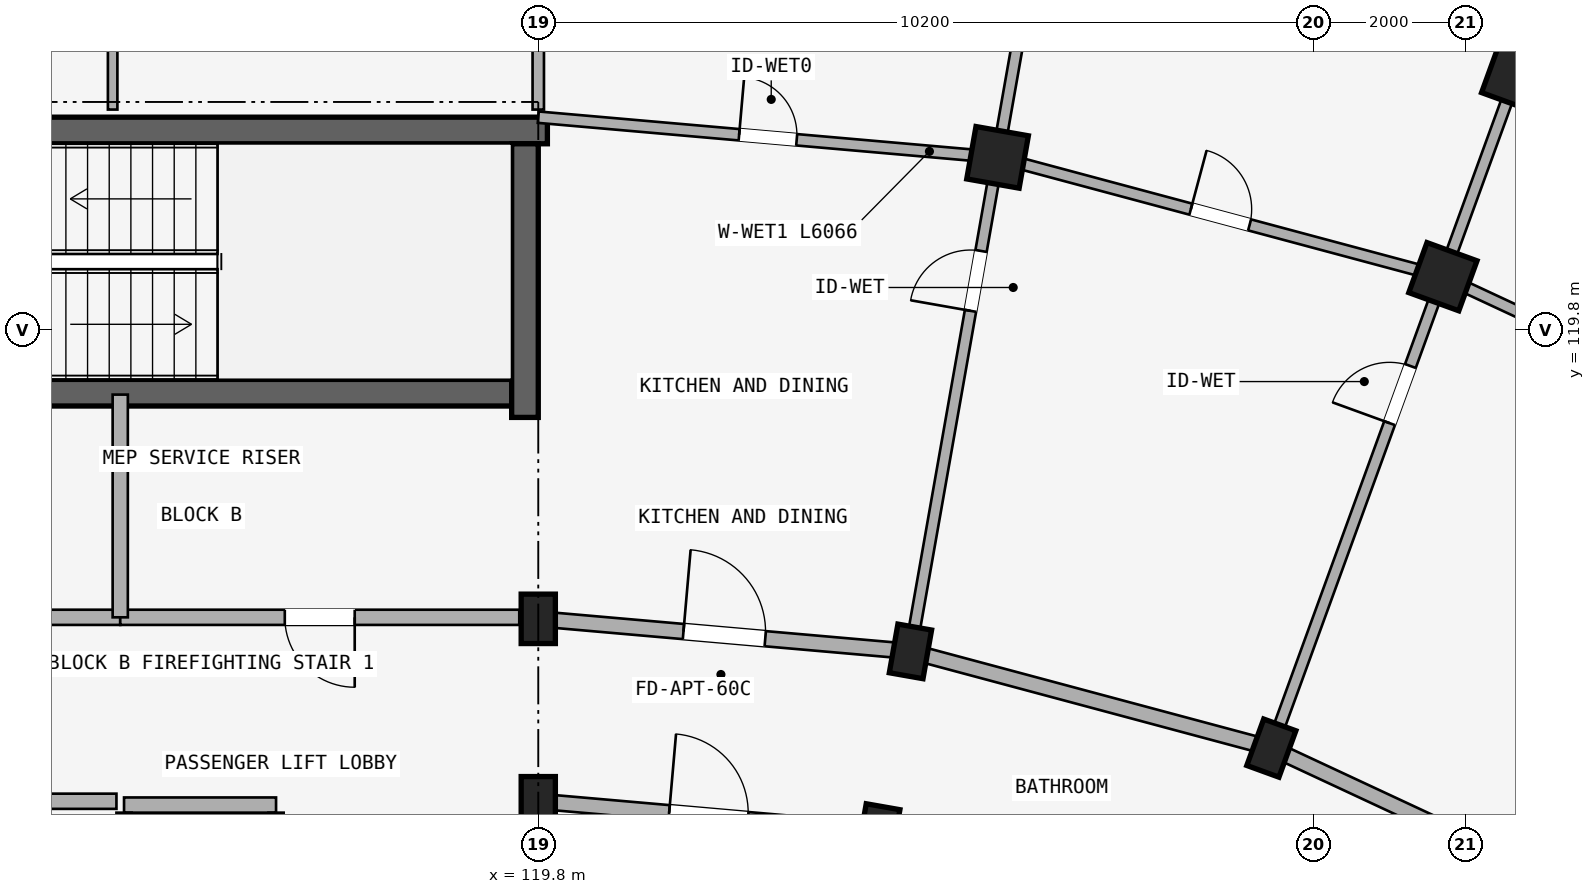
"""IFC4 building model, lengths in metres.
Left out: names, types, materials, properties, quantities, classifications, styles, units other than length and angle.
Written with IfcOpenShell. Run it as: python <this file> out.ifc"""

import sys

from ifc_helpers import new_model, si_unit, direction, frame, frame_2d, origin, origin_2d, place, context, subcontext, project, spatial, rectangle, extrude, element, fill, save


model = new_model("IFC4")
c1 = context("Model", 3, precision=1e-05, world=origin(), true_north=direction((0.0, 1.0)))
c2 = subcontext(c1, "Body", "Model", "MODEL_VIEW")
j1 = project(units=[si_unit("LENGTHUNIT", "METRE"), si_unit("PLANEANGLEUNIT", "RADIAN")], contexts=[c1])
p1 = place(None, origin())
s1 = spatial("IfcSite", under=j1, at=p1, CompositionType="ELEMENT")
p2 = place(p1, origin())
s2 = spatial("IfcBuilding", under=s1, at=p2, CompositionType="ELEMENT")
p3 = place(p2, frame((0.0, 0.0, 27.6)))
s3 = spatial("IfcBuildingStorey", under=s2, at=p3, CompositionType="ELEMENT", Elevation=27.6)
p4 = place(p3, frame((119.92, 122.425, 0.0), z_axis=(0.0, 0.0, 1.0), x_axis=(-1.0, 0.0, 0.0)))
e1 = element("IfcWall", 1, at=p4, inside=s3, PredefinedType="SHEAR", context=c2, shape_type="SweptSolid", body=[
    extrude(rectangle(XDim=8.545, YDim=0.35, at=frame_2d((4.272, 0.0))), origin(), (0.0, 0.0, 1.0), 2.93),
])
p5 = place(p3, frame((119.45, 118.975, 0.0), z_axis=(0.0, 0.0, 1.0), x_axis=(-1.0, 0.0, 0.0)))
e2 = element("IfcWall", 2, at=p5, inside=s3, PredefinedType="SHEAR", context=c2, shape_type="SweptSolid", body=[
    extrude(rectangle(XDim=8.075, YDim=0.35, at=frame_2d((4.038, 0.0))), origin(), (0.0, 0.0, 1.0), 2.93),
])
p6 = place(p5, frame((6.38, 0.0, 0.0)))
e3 = element("IfcOpeningElement", 3, at=p6, cuts=e2, PredefinedType="OPENING", context=c2, shape_type="SweptSolid", body=[
    extrude(rectangle(XDim=1.24, YDim=2.15, at=frame_2d((0.62, 1.075))), frame((0.0, 0.185, 0.0), z_axis=(0.0, -1.0, 0.0), x_axis=(1.0, 0.0, 0.0)), (0.0, 0.0, 1.0), 0.37),
])
p7 = place(p3, frame((119.625, 118.65, 0.0), z_axis=(0.0, 0.0, 1.0), x_axis=(0.0, 1.0, 0.0)))
e4 = element("IfcWall", 4, at=p7, inside=s3, PredefinedType="SHEAR", context=c2, shape_type="SweptSolid", body=[
    extrude(rectangle(XDim=3.6, YDim=0.35, at=frame_2d((1.8, 0.0))), origin(), (0.0, 0.0, 1.0), 2.93),
])
for number, where, z_axis, x_axis in (
    (5, (119.8, 113.6, 0.0), (0.0, 0.0, 1.0), (1.0, 0.0, 0.0)),
    (6, (119.8, 116.0, 0.0), (0.0, 0.0, 1.0), (1.0, 0.0, 0.0)),
    (7, (124.28, 113.208, 0.0), (0.0, 0.0, 1.0), (-0.985, 0.174, 0.0)),
    (8, (124.697, 115.572, 0.0), (0.0, 0.0, 1.0), (-0.985, 0.174, 0.0)),
):
    element("IfcColumn", number, at=place(p3, frame(where, z_axis=z_axis, x_axis=x_axis)), inside=s3, PredefinedType="COLUMN", context=c2, shape_type="SweptSolid", body=[
        extrude(rectangle(XDim=0.45, YDim=0.65, at=origin_2d()), origin(), (0.0, 0.0, 1.0), 2.93),
    ])
p8 = place(p3, frame((125.843, 122.071, 0.0), z_axis=(0.0, 0.0, 1.0), x_axis=(-0.984807753012, 0.173648177667, 0.0)))
e9 = element("IfcColumn", 9, at=p8, inside=s3, PredefinedType="COLUMN", context=c2, shape_type="SweptSolid", body=[
    extrude(rectangle(XDim=0.7, YDim=0.7, at=origin_2d()), origin(), (0.0, 0.0, 1.0), 2.93),
])
p9 = place(p3, frame((129.445, 114.299, 0.0), z_axis=(0.0, 0.0, 1.0), x_axis=(-0.939692620786, 0.342020143326, 0.0)))
e10 = element("IfcColumn", 10, at=p9, inside=s3, PredefinedType="COLUMN", context=c2, shape_type="SweptSolid", body=[
    extrude(rectangle(XDim=0.45, YDim=0.65, at=origin_2d()), origin(), (0.0, 0.0, 1.0), 2.93),
])
for number, where, z_axis, x_axis in (
    (11, (131.702, 120.501, 0.0), (0.0, 0.0, 1.0), (-0.94, 0.342, 0.0)),
    (12, (132.66, 123.132, 0.0), (0.0, 0.0, 1.0), (-0.94, 0.342, 0.0)),
):
    element("IfcColumn", number, at=place(p3, frame(where, z_axis=z_axis, x_axis=x_axis)), inside=s3, PredefinedType="COLUMN", context=c2, shape_type="SweptSolid", body=[
        extrude(rectangle(XDim=0.7, YDim=0.7, at=origin_2d()), origin(), (0.0, 0.0, 1.0), 2.93),
    ])
p10 = place(p3, frame((114.3, 116.02, 0.0), z_axis=(0.0, 0.0, 1.0), x_axis=(-1.0, 0.0, 0.0)))
e13 = element("IfcWall", 13, at=p10, inside=s3, PredefinedType="STANDARD", context=c2, shape_type="SweptSolid", body=[
    extrude(rectangle(XDim=5.65, YDim=0.2, at=frame_2d((2.825, 0.0))), origin(), (0.0, 0.0, 1.0), 2.372),
])
p11 = place(p10, frame((1.923, 0.0, 0.0)))
e14 = element("IfcOpeningElement", 14, at=p11, cuts=e13, PredefinedType="OPENING", context=c2, shape_type="SweptSolid", body=[
    extrude(rectangle(XDim=1.24, YDim=2.15, at=frame_2d((0.62, 1.075))), frame((0.0, 0.11, 0.0), z_axis=(0.0, -1.0, 0.0), x_axis=(1.0, 0.0, 0.0)), (0.0, 0.0, 1.0), 0.22),
])
p12 = place(p3, frame((119.55, 116.02, 0.0), z_axis=(0.0, 0.0, 1.0), x_axis=(-1.0, 0.0, 0.0)))
e15 = element("IfcWall", 15, at=p12, inside=s3, PredefinedType="STANDARD", context=c2, shape_type="SweptSolid", body=[
    extrude(rectangle(XDim=5.25, YDim=0.2, at=frame_2d((2.625, 0.0))), origin(), (0.0, 0.0, 1.0), 2.372),
])
p13 = place(p12, frame((2.165, 0.0, 0.0)))
e16 = element("IfcOpeningElement", 16, at=p13, cuts=e15, PredefinedType="OPENING", context=c2, shape_type="SweptSolid", body=[
    extrude(rectangle(XDim=0.92, YDim=2.1, at=frame_2d((0.46, 1.05))), frame((0.0, 0.11, 0.0), z_axis=(0.0, -1.0, 0.0), x_axis=(1.0, 0.0, 0.0)), (0.0, 0.0, 1.0), 0.22),
])
p14 = place(p3, frame((114.3, 116.02, 0.0), z_axis=(0.0, 0.0, 1.0), x_axis=(0.0, 1.0, 0.0)))
e17 = element("IfcWall", 17, at=p14, inside=s3, PredefinedType="STANDARD", context=c2, shape_type="SweptSolid", body=[
    extrude(rectangle(XDim=2.93, YDim=0.2, at=frame_2d((1.465, 0.0))), origin(), (0.0, 0.0, 1.0), 2.372),
])
p15 = place(p3, frame((116.35, 113.55, 0.0), z_axis=(0.0, 0.0, 1.0), x_axis=(-1.0, 0.0, 0.0)))
e18 = element("IfcWall", 18, at=p15, inside=s3, PredefinedType="STANDARD", context=c2, shape_type="SweptSolid", body=[
    extrude(rectangle(XDim=2.0, YDim=0.2, at=frame_2d((1.0, 0.0))), origin(), (0.0, 0.0, 1.0), 2.372),
])
p16 = place(p3, frame((116.35, 110.85, 0.0), z_axis=(0.0, 0.0, 1.0), x_axis=(0.0, 1.0, 0.0)))
e19 = element("IfcWall", 19, at=p16, inside=s3, PredefinedType="STANDARD", context=c2, shape_type="SweptSolid", body=[
    extrude(rectangle(XDim=2.6, YDim=0.2, at=frame_2d((1.3, 0.0))), origin(), (0.0, 0.0, 1.0), 2.372),
])
p17 = place(p3, frame((114.35, 110.85, 0.0), z_axis=(0.0, 0.0, 1.0), x_axis=(0.0, 1.0, 0.0)))
e20 = element("IfcWall", 20, at=p17, inside=s3, PredefinedType="STANDARD", context=c2, shape_type="SweptSolid", body=[
    extrude(rectangle(XDim=2.6, YDim=0.2, at=frame_2d((1.3, 0.0))), origin(), (0.0, 0.0, 1.0), 2.372),
])
p18 = place(p17, frame((0.79, 0.0, 0.0)))
e21 = element("IfcOpeningElement", 21, at=p18, cuts=e20, PredefinedType="OPENING", context=c2, shape_type="SweptSolid", body=[
    extrude(rectangle(XDim=1.02, YDim=2.15, at=frame_2d((0.51, 1.075))), frame((0.0, 0.11, 0.0), z_axis=(0.0, -1.0, 0.0), x_axis=(1.0, 0.0, 0.0)), (0.0, 0.0, 1.0), 0.22),
])
p19 = place(p3, frame((114.25, 113.6, 0.0), z_axis=(0.0, 0.0, 1.0), x_axis=(-1.0, 0.0, 0.0)))
e22 = element("IfcWall", 22, at=p19, inside=s3, PredefinedType="STANDARD", context=c2, shape_type="SweptSolid", body=[
    extrude(rectangle(XDim=5.6, YDim=0.2, at=frame_2d((2.8, 0.0))), origin(), (0.0, 0.0, 1.0), 2.372),
])
p20 = place(p19, frame((1.91, 0.0, 0.0)))
e23 = element("IfcOpeningElement", 23, at=p20, cuts=e22, PredefinedType="OPENING", context=c2, shape_type="SweptSolid", body=[
    extrude(rectangle(XDim=1.22, YDim=2.15, at=frame_2d((0.61, 1.075))), frame((0.0, 0.11, 0.0), z_axis=(0.0, -1.0, 0.0), x_axis=(1.0, 0.0, 0.0)), (0.0, 0.0, 1.0), 0.22),
])
p21 = place(p3, frame((114.2, 122.7, 0.0), z_axis=(0.0, 0.0, 1.0), x_axis=(0.0, 1.0, 0.0)))
e24 = element("IfcWall", 24, at=p21, inside=s3, PredefinedType="PARTITIONING", context=c2, shape_type="SweptSolid", body=[
    extrude(rectangle(XDim=10.82, YDim=0.125, at=frame_2d((5.41, 0.0))), origin(), (0.0, 0.0, 1.0), 2.372),
])
p22 = place(p21, frame((0.899, 0.0, 0.0)))
e25 = element("IfcOpeningElement", 25, at=p22, cuts=e24, PredefinedType="OPENING", context=c2, shape_type="SweptSolid", body=[
    extrude(rectangle(XDim=0.8, YDim=2.1, at=frame_2d((0.4, 1.05))), frame((0.0, 0.073, 0.0), z_axis=(0.0, -1.0, 0.0), x_axis=(1.0, 0.0, 0.0)), (0.0, 0.0, 1.0), 0.145),
])
p23 = place(p3, frame((119.8, 113.6, 0.0), z_axis=(0.0, 0.0, 1.0), x_axis=(0.996191949488, -0.087187153726, 0.0)))
e26 = element("IfcWall", 26, at=p23, inside=s3, PredefinedType="STANDARD", context=c2, shape_type="SweptSolid", body=[
    extrude(rectangle(XDim=4.497, YDim=0.2, at=frame_2d((2.249, 0.0))), origin(), (0.0, 0.0, 1.0), 2.372),
])
p24 = place(p23, frame((1.729, 0.0, 0.0)))
e27 = element("IfcOpeningElement", 27, at=p24, cuts=e26, PredefinedType="OPENING", context=c2, shape_type="SweptSolid", body=[
    extrude(rectangle(XDim=1.04, YDim=2.15, at=frame_2d((0.52, 1.075))), frame((0.0, 0.11, 0.0), z_axis=(0.0, -1.0, 0.0), x_axis=(1.0, 0.0, 0.0)), (0.0, 0.0, 1.0), 0.22),
])
p25 = place(p3, frame((119.8, 116.0, 0.0), z_axis=(0.0, 0.0, 1.0), x_axis=(0.996193663584, -0.087167566415, 0.0)))
e28 = element("IfcWall", 28, at=p25, inside=s3, PredefinedType="STANDARD", context=c2, shape_type="SweptSolid", body=[
    extrude(rectangle(XDim=4.916, YDim=0.2, at=frame_2d((2.458, 0.0))), origin(), (0.0, 0.0, 1.0), 2.372),
])
p26 = place(p25, frame((1.918, 0.0, 0.0)))
e29 = element("IfcOpeningElement", 29, at=p26, cuts=e28, PredefinedType="OPENING", context=c2, shape_type="SweptSolid", body=[
    extrude(rectangle(XDim=1.08, YDim=2.15, at=frame_2d((0.54, 1.075))), frame((0.0, 0.11, 0.0), z_axis=(0.0, -1.0, 0.0), x_axis=(1.0, 0.0, 0.0)), (0.0, 0.0, 1.0), 0.22),
])
p27 = place(p3, frame((124.697, 115.572, 0.0), z_axis=(0.0, 0.0, 1.0), x_axis=(0.965930095386, -0.258803112091, 0.0)))
e30 = element("IfcWall", 30, at=p27, inside=s3, PredefinedType="STANDARD", context=c2, shape_type="SweptSolid", body=[
    extrude(rectangle(XDim=4.916, YDim=0.2, at=frame_2d((2.458, 0.0))), origin(), (0.0, 0.0, 1.0), 2.372),
])
p28 = place(p3, frame((129.445, 114.299, 0.0), z_axis=(0.0, 0.0, 1.0), x_axis=(0.906302381024, -0.422629854778, 0.0)))
e31 = element("IfcWall", 31, at=p28, inside=s3, PredefinedType="STANDARD", context=c2, shape_type="SweptSolid", body=[
    extrude(rectangle(XDim=4.915, YDim=0.2, at=frame_2d((2.458, 0.0))), origin(), (0.0, 0.0, 1.0), 2.372),
])
p29 = place(p3, frame((119.8, 110.35, 0.0), z_axis=(0.0, 0.0, 1.0), x_axis=(0.0, 1.0, 0.0)))
e32 = element("IfcWall", 32, at=p29, inside=s3, PredefinedType="STANDARD", context=c2, shape_type="SweptSolid", body=[
    extrude(rectangle(XDim=3.2, YDim=0.22, at=frame_2d((1.6, 0.0))), origin(), (0.0, 0.0, 1.0), 2.372),
])
p30 = place(p3, frame((119.8, 122.7, 0.0), z_axis=(0.0, 0.0, 1.0), x_axis=(0.0, 1.0, 0.0)))
e33 = element("IfcWall", 33, at=p30, inside=s3, PredefinedType="PARTITIONING", context=c2, shape_type="SweptSolid", body=[
    extrude(rectangle(XDim=10.82, YDim=0.15, at=frame_2d((5.41, 0.0))), origin(), (0.0, 0.0, 1.0), 2.372),
])
p31 = place(p30, frame((0.899, 0.0, 0.0)))
e34 = element("IfcOpeningElement", 34, at=p31, cuts=e33, PredefinedType="OPENING", context=c2, shape_type="SweptSolid", body=[
    extrude(rectangle(XDim=0.8, YDim=2.1, at=frame_2d((0.4, 1.05))), frame((0.0, 0.085, 0.0), z_axis=(0.0, -1.0, 0.0), x_axis=(1.0, 0.0, 0.0)), (0.0, 0.0, 1.0), 0.17),
])
p32 = place(p3, frame((124.714, 115.67, 0.0), z_axis=(0.0, 0.0, 1.0), x_axis=(0.173646216546, 0.984808098809, 0.0)))
e35 = element("IfcWall", 35, at=p32, inside=s3, PredefinedType="PARTITIONING", context=c2, shape_type="SweptSolid", body=[
    extrude(rectangle(XDim=17.42, YDim=0.15, at=frame_2d((8.71, 0.0))), origin(), (0.0, 0.0, 1.0), 2.372),
])
p33 = place(p32, frame((4.45, 0.0, 0.0)))
e36 = element("IfcOpeningElement", 36, at=p33, cuts=e35, PredefinedType="OPENING", context=c2, shape_type="SweptSolid", body=[
    extrude(rectangle(XDim=0.8, YDim=2.1, at=frame_2d((0.4, 1.05))), frame((0.0, 0.085, 0.0), z_axis=(0.0, -1.0, 0.0), x_axis=(1.0, 0.0, 0.0)), (0.0, 0.0, 1.0), 0.17),
])
p34 = place(p3, frame((129.479, 114.393, 0.0), z_axis=(0.0, 0.0, 1.0), x_axis=(0.342022120477, 0.939691901159, 0.0)))
e37 = element("IfcWall", 37, at=p34, inside=s3, PredefinedType="PARTITIONING", context=c2, shape_type="SweptSolid", body=[
    extrude(rectangle(XDim=17.42, YDim=0.15, at=frame_2d((8.71, 0.0))), origin(), (0.0, 0.0, 1.0), 2.372),
])
p35 = place(p34, frame((4.45, 0.0, 0.0)))
e38 = element("IfcOpeningElement", 38, at=p35, cuts=e37, PredefinedType="OPENING", context=c2, shape_type="SweptSolid", body=[
    extrude(rectangle(XDim=0.8, YDim=2.1, at=frame_2d((0.4, 1.05))), frame((0.0, 0.085, 0.0), z_axis=(0.0, -1.0, 0.0), x_axis=(1.0, 0.0, 0.0)), (0.0, 0.0, 1.0), 0.17),
])
p36 = place(p3, frame((119.8, 122.6, 0.0), z_axis=(0.0, 0.0, 1.0), x_axis=(0.996193018494, -0.087174938512, 0.0)))
e39 = element("IfcWall", 39, at=p36, inside=s3, PredefinedType="PLUMBINGWALL", context=c2, shape_type="SweptSolid", body=[
    extrude(rectangle(XDim=6.066, YDim=0.15, at=frame_2d((3.033, 0.0))), origin(), (0.0, 0.0, 1.0), 2.372),
])
p37 = place(p36, frame((2.653, 0.0, 0.0)))
e40 = element("IfcOpeningElement", 40, at=p37, cuts=e39, PredefinedType="OPENING", context=c2, shape_type="SweptSolid", body=[
    extrude(rectangle(XDim=0.76, YDim=2.05, at=frame_2d((0.38, 1.025))), frame((0.0, 0.085, 0.0), z_axis=(0.0, -1.0, 0.0), x_axis=(1.0, 0.0, 0.0)), (0.0, 0.0, 1.0), 0.17),
])
p38 = place(p3, frame((125.843, 122.071, 0.0), z_axis=(0.0, 0.0, 1.0), x_axis=(0.965923618901, -0.258827283048, 0.0)))
e41 = element("IfcWall", 41, at=p38, inside=s3, PredefinedType="PLUMBINGWALL", context=c2, shape_type="SweptSolid", body=[
    extrude(rectangle(XDim=6.066, YDim=0.15, at=frame_2d((3.033, 0.0))), origin(), (0.0, 0.0, 1.0), 2.372),
])
p39 = place(p38, frame((2.633, 0.0, 0.0)))
e42 = element("IfcOpeningElement", 42, at=p39, cuts=e41, PredefinedType="OPENING", context=c2, shape_type="SweptSolid", body=[
    extrude(rectangle(XDim=0.8, YDim=2.1, at=frame_2d((0.4, 1.05))), frame((0.0, 0.085, 0.0), z_axis=(0.0, -1.0, 0.0), x_axis=(1.0, 0.0, 0.0)), (0.0, 0.0, 1.0), 0.17),
])
p40 = place(p3, frame((131.702, 120.501, 0.0), z_axis=(0.0, 0.0, 1.0), x_axis=(0.906312656069, -0.42260781991, 0.0)))
e43 = element("IfcWall", 43, at=p40, inside=s3, PredefinedType="PLUMBINGWALL", context=c2, shape_type="SweptSolid", body=[
    extrude(rectangle(XDim=6.066, YDim=0.15, at=frame_2d((3.033, 0.0))), origin(), (0.0, 0.0, 1.0), 2.372),
])
p41 = place(p40, frame((2.613, 0.0, 0.0)))
e44 = element("IfcOpeningElement", 44, at=p41, cuts=e43, PredefinedType="OPENING", context=c2, shape_type="SweptSolid", body=[
    extrude(rectangle(XDim=0.84, YDim=2.1, at=frame_2d((0.42, 1.05))), frame((0.0, 0.085, 0.0), z_axis=(0.0, -1.0, 0.0), x_axis=(1.0, 0.0, 0.0)), (0.0, 0.0, 1.0), 0.17),
])
p42 = place(p13, frame((0.92, 0.0, 0.0), z_axis=(0.0, 0.0, 1.0), x_axis=(-1.0, 0.0, 0.0)))
e45 = element("IfcDoor", 45, at=p42, inside=s3, OperationType="SINGLE_SWING_RIGHT", PredefinedType="DOOR", context=c2, shape_type="SweptSolid", body=[
    extrude(rectangle(XDim=0.92, YDim=2.1, at=frame_2d((0.46, 1.05))), frame((0.0, 0.025, 0.0), z_axis=(0.0, -1.0, 0.0), x_axis=(1.0, 0.0, 0.0)), (0.0, 0.0, 1.0), 0.05),
])
fill(e16, e45)
p43 = place(p33, origin())
e46 = element("IfcDoor", 46, at=p43, inside=s3, OperationType="SINGLE_SWING_LEFT", PredefinedType="DOOR", context=c2, shape_type="SweptSolid", body=[
    extrude(rectangle(XDim=0.8, YDim=2.1, at=frame_2d((0.4, 1.05))), frame((0.0, 0.025, 0.0), z_axis=(0.0, -1.0, 0.0), x_axis=(1.0, 0.0, 0.0)), (0.0, 0.0, 1.0), 0.05),
])
fill(e36, e46)
p44 = place(p35, frame((0.8, 0.0, 0.0), z_axis=(0.0, 0.0, 1.0), x_axis=(-1.0, 0.0, 0.0)))
e47 = element("IfcDoor", 47, at=p44, inside=s3, OperationType="SINGLE_SWING_RIGHT", PredefinedType="DOOR", context=c2, shape_type="SweptSolid", body=[
    extrude(rectangle(XDim=0.8, YDim=2.1, at=frame_2d((0.4, 1.05))), frame((0.0, 0.025, 0.0), z_axis=(0.0, -1.0, 0.0), x_axis=(1.0, 0.0, 0.0)), (0.0, 0.0, 1.0), 0.05),
])
fill(e38, e47)
p45 = place(p26, origin())
e48 = element("IfcDoor", 48, at=p45, inside=s3, OperationType="SINGLE_SWING_LEFT", PredefinedType="DOOR", context=c2, shape_type="SweptSolid", body=[
    extrude(rectangle(XDim=1.08, YDim=2.15, at=frame_2d((0.54, 1.075))), frame((0.0, 0.025, 0.0), z_axis=(0.0, -1.0, 0.0), x_axis=(1.0, 0.0, 0.0)), (0.0, 0.0, 1.0), 0.05),
])
fill(e29, e48)
p46 = place(p37, frame((0.76, 0.0, 0.0), z_axis=(0.0, 0.0, 1.0), x_axis=(-1.0, 0.0, 0.0)))
e49 = element("IfcDoor", 49, at=p46, inside=s3, OperationType="SINGLE_SWING_RIGHT", PredefinedType="DOOR", context=c2, shape_type="SweptSolid", body=[
    extrude(rectangle(XDim=0.76, YDim=2.05, at=frame_2d((0.38, 1.025))), frame((0.0, 0.025, 0.0), z_axis=(0.0, -1.0, 0.0), x_axis=(1.0, 0.0, 0.0)), (0.0, 0.0, 1.0), 0.05),
])
fill(e40, e49)
p47 = place(p39, origin())
e50 = element("IfcDoor", 50, at=p47, inside=s3, OperationType="SINGLE_SWING_LEFT", PredefinedType="DOOR", context=c2, shape_type="SweptSolid", body=[
    extrude(rectangle(XDim=0.8, YDim=2.1, at=frame_2d((0.4, 1.05))), frame((0.0, 0.025, 0.0), z_axis=(0.0, -1.0, 0.0), x_axis=(1.0, 0.0, 0.0)), (0.0, 0.0, 1.0), 0.05),
])
fill(e42, e50)
p48 = place(p24, origin())
e51 = element("IfcDoor", 51, at=p48, inside=s3, OperationType="SINGLE_SWING_LEFT", PredefinedType="DOOR", context=c2, shape_type="SweptSolid", body=[
    extrude(rectangle(XDim=1.04, YDim=2.15, at=frame_2d((0.52, 1.075))), frame((0.0, 0.025, 0.0), z_axis=(0.0, -1.0, 0.0), x_axis=(1.0, 0.0, 0.0)), (0.0, 0.0, 1.0), 0.05),
])
fill(e27, e51)
save(model, sys.argv[1])
